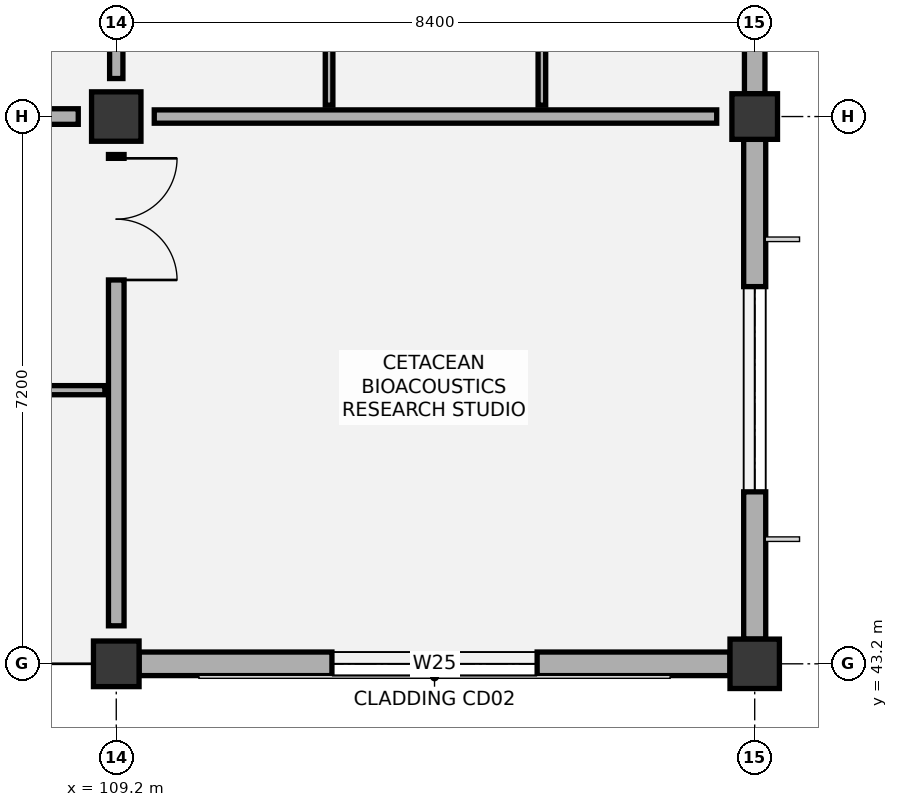
"""IFC4 building model, lengths in metres.
Left out: names, types, materials, properties, quantities, classifications, styles, units other than length and angle.
Written with IfcOpenShell. Run it as: python <this file> out.ifc"""

import sys

from ifc_helpers import new_model, si_unit, direction, frame, frame_2d, origin, origin_2d, place, context, subcontext, project, spatial, rectangle, extrude, element, fill, save


model = new_model("IFC4")
c1 = context("Model", 3, precision=1e-05, world=origin(), true_north=direction((0.0, 1.0)))
c2 = subcontext(c1, "Body", "Model", "MODEL_VIEW")
j1 = project(units=[si_unit("LENGTHUNIT", "METRE"), si_unit("PLANEANGLEUNIT", "RADIAN")], contexts=[c1])
p1 = place(None, origin())
s1 = spatial("IfcSite", under=j1, at=p1, CompositionType="ELEMENT")
p2 = place(p1, origin())
s2 = spatial("IfcBuilding", under=s1, at=p2, CompositionType="ELEMENT")
p3 = place(p2, frame((0.0, 0.0, 56.4)))
s3 = spatial("IfcBuildingStorey", under=s2, at=p3, CompositionType="ELEMENT", Elevation=56.4)
p4 = place(p3, frame((109.2, 43.2, 0.0), z_axis=(0.0, 0.0, 1.0), x_axis=(1.0, 0.0, 0.0)))
e1 = element("IfcColumn", 1, at=p4, inside=s3, PredefinedType="COLUMN", context=c2, shape_type="SweptSolid", body=[
    extrude(rectangle(XDim=0.6, YDim=0.6, at=origin_2d()), origin(), (0.0, 0.0, 1.0), 4.2),
])
for number, where, z_axis, x_axis in (
    (2, (109.2, 50.4, 0.0), (0.0, 0.0, 1.0), (1.0, 0.0, 0.0)),
    (3, (117.6, 43.2, 0.0), (0.0, 0.0, 1.0), (1.0, 0.0, 0.0)),
):
    element("IfcColumn", number, at=place(p3, frame(where, z_axis=z_axis, x_axis=x_axis)), inside=s3, PredefinedType="COLUMN", context=c2, shape_type="SweptSolid", body=[
        extrude(rectangle(XDim=0.65, YDim=0.65, at=origin_2d()), origin(), (0.0, 0.0, 1.0), 4.2),
    ])
p5 = place(p3, frame((117.6, 50.4, 0.0), z_axis=(0.0, 0.0, 1.0), x_axis=(1.0, 0.0, 0.0)))
e4 = element("IfcColumn", 4, at=p5, inside=s3, PredefinedType="COLUMN", context=c2, shape_type="SweptSolid", body=[
    extrude(rectangle(XDim=0.6, YDim=0.6, at=origin_2d()), origin(), (0.0, 0.0, 1.0), 4.2),
])
p6 = place(p3, frame((109.5, 43.2, 0.0), z_axis=(0.0, 0.0, 1.0), x_axis=(1.0, 0.0, 0.0)))
e5 = element("IfcWall", 5, at=p6, inside=s3, PredefinedType="SOLIDWALL", context=c2, shape_type="SweptSolid", body=[
    extrude(rectangle(XDim=7.775, YDim=0.31, at=frame_2d((3.887, 0.0))), origin(), (0.0, 0.0, 1.0), 3.295),
])
p7 = place(p6, frame((2.538, 0.0, 0.95)))
e6 = element("IfcOpeningElement", 6, at=p7, cuts=e5, PredefinedType="OPENING", context=c2, shape_type="SweptSolid", body=[
    extrude(rectangle(XDim=2.7, YDim=1.65, at=frame_2d((1.35, 0.825))), frame((0.0, 0.165, 0.0), z_axis=(0.0, -1.0, 0.0), x_axis=(1.0, 0.0, 0.0)), (0.0, 0.0, 1.0), 0.33),
])
p8 = place(p3, frame((117.6, 43.525, 0.0), z_axis=(0.0, 0.0, 1.0), x_axis=(0.0, 1.0, 0.0)))
e7 = element("IfcWall", 7, at=p8, inside=s3, PredefinedType="SOLIDWALL", context=c2, shape_type="SweptSolid", body=[
    extrude(rectangle(XDim=6.575, YDim=0.29, at=frame_2d((3.288, 0.0))), origin(), (0.0, 0.0, 1.0), 3.295),
])
p9 = place(p8, frame((1.938, 0.0, 0.95)))
e8 = element("IfcOpeningElement", 8, at=p9, cuts=e7, PredefinedType="OPENING", context=c2, shape_type="SweptSolid", body=[
    extrude(rectangle(XDim=2.7, YDim=1.65, at=frame_2d((1.35, 0.825))), frame((0.0, 0.155, 0.0), z_axis=(0.0, -1.0, 0.0), x_axis=(1.0, 0.0, 0.0)), (0.0, 0.0, 1.0), 0.31),
])
p10 = place(p3, frame((117.6, 50.7, 0.0), z_axis=(0.0, 0.0, 1.0), x_axis=(0.0, 1.0, 0.0)))
e9 = element("IfcWall", 9, at=p10, inside=s3, PredefinedType="SOLIDWALL", context=c2, shape_type="SweptSolid", body=[
    extrude(rectangle(XDim=6.575, YDim=0.27, at=frame_2d((3.288, 0.0))), origin(), (0.0, 0.0, 1.0), 3.295),
])
for number, where, z_axis, x_axis in (
    (10, (112.0, 50.55, 0.0), (0.0, 0.0, 1.0), (0.0, 1.0, 0.0)),
    (11, (114.8, 50.55, 0.0), (0.0, 0.0, 1.0), (0.0, 1.0, 0.0)),
):
    element("IfcWall", number, at=place(p3, frame(where, z_axis=z_axis, x_axis=x_axis)), inside=s3, PredefinedType="PARTITIONING", context=c2, shape_type="SweptSolid", body=[
        extrude(rectangle(XDim=4.59, YDim=0.1, at=frame_2d((2.295, 0.0))), origin(), (0.0, 0.0, 1.0), 3.85),
    ])
p11 = place(p3, frame((100.95, 46.8, 0.0), z_axis=(0.0, 0.0, 1.0), x_axis=(1.0, 0.0, 0.0)))
e12 = element("IfcWall", 12, at=p11, inside=s3, PredefinedType="PARTITIONING", context=c2, shape_type="SweptSolid", body=[
    extrude(rectangle(XDim=8.1, YDim=0.12, at=frame_2d((4.05, 0.0))), origin(), (0.0, 0.0, 1.0), 3.92),
])
p12 = place(p11, frame((3.55, 0.0, 0.0)))
e13 = element("IfcOpeningElement", 13, at=p12, cuts=e12, PredefinedType="OPENING", context=c2, shape_type="SweptSolid", body=[
    extrude(rectangle(XDim=1.6, YDim=2.2, at=frame_2d((0.8, 1.1))), frame((0.0, 0.07, 0.0), z_axis=(0.0, -1.0, 0.0), x_axis=(1.0, 0.0, 0.0)), (0.0, 0.0, 1.0), 0.14),
])
p13 = place(p3, frame((109.2, 43.7, 0.0), z_axis=(0.0, 0.0, 1.0), x_axis=(0.0, 1.0, 0.0)))
e14 = element("IfcWall", 14, at=p13, inside=s3, PredefinedType="PARTITIONING", context=c2, shape_type="SweptSolid", body=[
    extrude(rectangle(XDim=6.2, YDim=0.205, at=frame_2d((3.1, 0.0))), origin(), (0.0, 0.0, 1.0), 3.345),
])
p14 = place(p13, frame((4.55, 0.0, 0.0)))
e15 = element("IfcOpeningElement", 15, at=p14, cuts=e14, PredefinedType="OPENING", context=c2, shape_type="SweptSolid", body=[
    extrude(rectangle(XDim=1.6, YDim=2.2, at=frame_2d((0.8, 1.1))), frame((0.0, 0.113, 0.0), z_axis=(0.0, -1.0, 0.0), x_axis=(1.0, 0.0, 0.0)), (0.0, 0.0, 1.0), 0.225),
])
p15 = place(p3, frame((101.3, 50.4, 0.0), z_axis=(0.0, 0.0, 1.0), x_axis=(1.0, 0.0, 0.0)))
e16 = element("IfcWall", 16, at=p15, inside=s3, PredefinedType="PARTITIONING", context=c2, shape_type="SweptSolid", body=[
    extrude(rectangle(XDim=7.4, YDim=0.205, at=frame_2d((3.7, 0.0))), origin(), (0.0, 0.0, 1.0), 3.415),
])
p16 = place(p15, frame((2.975, 0.0, 0.0)))
e17 = element("IfcOpeningElement", 17, at=p16, cuts=e16, PredefinedType="OPENING", context=c2, shape_type="SweptSolid", body=[
    extrude(rectangle(XDim=1.45, YDim=2.2, at=frame_2d((0.725, 1.1))), frame((0.0, 0.113, 0.0), z_axis=(0.0, -1.0, 0.0), x_axis=(1.0, 0.0, 0.0)), (0.0, 0.0, 1.0), 0.225),
])
p17 = place(p3, frame((109.2, 50.9, 0.0), z_axis=(0.0, 0.0, 1.0), x_axis=(0.0, 1.0, 0.0)))
e18 = element("IfcWall", 18, at=p17, inside=s3, PredefinedType="PARTITIONING", context=c2, shape_type="SweptSolid", body=[
    extrude(rectangle(XDim=6.2, YDim=0.175, at=frame_2d((3.1, 0.0))), origin(), (0.0, 0.0, 1.0), 3.555),
])
p18 = place(p3, frame((109.7, 50.4, 0.0), z_axis=(0.0, 0.0, 1.0), x_axis=(1.0, 0.0, 0.0)))
e19 = element("IfcWall", 19, at=p18, inside=s3, PredefinedType="PARTITIONING", context=c2, shape_type="SweptSolid", body=[
    extrude(rectangle(XDim=7.4, YDim=0.175, at=frame_2d((3.7, 0.0))), origin(), (0.0, 0.0, 1.0), 3.345),
])
p19 = place(p7, origin())
e20 = element("IfcWindow", 20, at=p19, inside=s3, PartitioningType="SINGLE_PANEL", PredefinedType="WINDOW", context=c2, shape_type="SweptSolid", body=[
    extrude(rectangle(XDim=2.7, YDim=1.65, at=frame_2d((1.35, 0.825))), frame((0.0, 0.03, 0.0), z_axis=(0.0, -1.0, 0.0), x_axis=(1.0, 0.0, 0.0)), (0.0, 0.0, 1.0), 0.06),
])
fill(e6, e20)
p20 = place(p9, origin())
e21 = element("IfcWindow", 21, at=p20, inside=s3, PartitioningType="SINGLE_PANEL", PredefinedType="WINDOW", context=c2, shape_type="SweptSolid", body=[
    extrude(rectangle(XDim=2.7, YDim=1.65, at=frame_2d((1.35, 0.825))), frame((0.0, 0.03, 0.0), z_axis=(0.0, -1.0, 0.0), x_axis=(1.0, 0.0, 0.0)), (0.0, 0.0, 1.0), 0.06),
])
fill(e8, e21)
p21 = place(p14, frame((1.6, 0.0, 0.0), z_axis=(0.0, 0.0, 1.0), x_axis=(-1.0, 0.0, 0.0)))
e22 = element("IfcDoor", 22, at=p21, inside=s3, OperationType="DOUBLE_DOOR_SINGLE_SWING", PredefinedType="DOOR", context=c2, shape_type="SweptSolid", body=[
    extrude(rectangle(XDim=1.6, YDim=2.2, at=frame_2d((0.8, 1.1))), frame((0.0, 0.025, 0.0), z_axis=(0.0, -1.0, 0.0), x_axis=(1.0, 0.0, 0.0)), (0.0, 0.0, 1.0), 0.05),
])
fill(e15, e22)
save(model, sys.argv[1])
